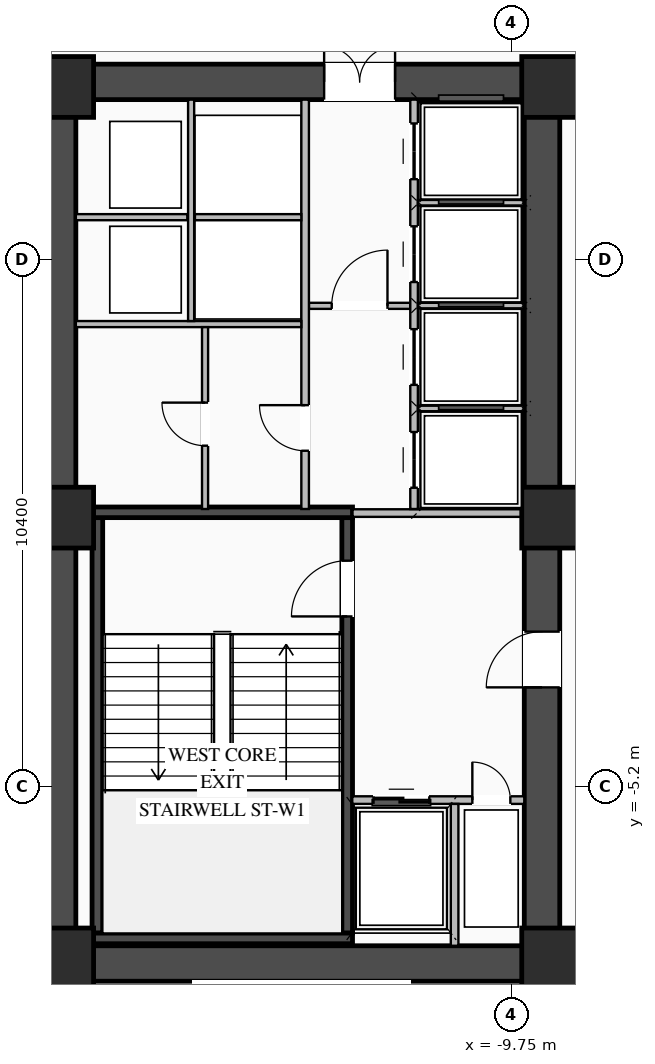
"""IFC4 building model, lengths in metres.
Left out: names, types, materials, properties, quantities, classifications, styles, units other than length and angle.
Written with IfcOpenShell. Run it as: python <this file> out.ifc"""

import sys

from ifc_helpers import new_model, si_unit, direction, frame, frame_2d, origin, origin_2d, place, context, subcontext, project, spatial, rectangle, extrude, element, fill, save


model = new_model("IFC4")
c1 = context("Model", 3, precision=1e-05, world=origin(), true_north=direction((0.0, 1.0)))
c2 = subcontext(c1, "Body", "Model", "MODEL_VIEW")
j1 = project(units=[si_unit("LENGTHUNIT", "METRE"), si_unit("PLANEANGLEUNIT", "RADIAN")], contexts=[c1])
p1 = place(None, origin())
s1 = spatial("IfcSite", under=j1, at=p1, CompositionType="ELEMENT")
p2 = place(p1, origin())
s2 = spatial("IfcBuilding", under=s1, at=p2, CompositionType="ELEMENT")
p3 = place(p2, frame((0.0, 0.0, 5.1)))
s3 = spatial("IfcBuildingStorey", under=s2, at=p3, CompositionType="ELEMENT", Elevation=5.1)
p4 = place(p3, frame((-19.05, -8.7, 0.0), z_axis=(0.0, 0.0, 1.0), x_axis=(1.0, 0.0, 0.0)))
e1 = element("IfcWall", 1, at=p4, inside=s3, PredefinedType="SHEAR", context=c2, shape_type="SweptSolid", body=[
    extrude(rectangle(XDim=10.25, YDim=0.7, at=frame_2d((5.125, 0.0))), origin(), (0.0, 0.0, 1.0), 4.25),
])
p5 = place(p3, frame((-19.05, 8.7, 0.0), z_axis=(0.0, 0.0, 1.0), x_axis=(1.0, 0.0, 0.0)))
e2 = element("IfcWall", 2, at=p5, inside=s3, PredefinedType="SHEAR", context=c2, shape_type="SweptSolid", body=[
    extrude(rectangle(XDim=10.25, YDim=0.7, at=frame_2d((5.125, 0.0))), origin(), (0.0, 0.0, 1.0), 4.25),
])
p6 = place(p5, frame((5.6, 0.0, 0.0)))
e3 = element("IfcOpeningElement", 3, at=p6, cuts=e2, PredefinedType="OPENING", context=c2, shape_type="SweptSolid", body=[
    extrude(rectangle(XDim=1.4, YDim=2.05, at=frame_2d((0.7, 1.025))), frame((0.0, 0.36, 0.0), z_axis=(0.0, -1.0, 0.0), x_axis=(1.0, 0.0, 0.0)), (0.0, 0.0, 1.0), 0.72),
])
p7 = place(p3, frame((-18.7, -8.35, 0.0), z_axis=(0.0, 0.0, 1.0), x_axis=(0.0, 1.0, 0.0)))
e4 = element("IfcWall", 4, at=p7, inside=s3, PredefinedType="SHEAR", context=c2, shape_type="SweptSolid", body=[
    extrude(rectangle(XDim=16.7, YDim=0.7, at=frame_2d((8.35, 0.0))), origin(), (0.0, 0.0, 1.0), 4.25),
])
p8 = place(p3, frame((-9.15, -8.35, 0.0), z_axis=(0.0, 0.0, 1.0), x_axis=(0.0, 1.0, 0.0)))
e5 = element("IfcWall", 5, at=p8, inside=s3, PredefinedType="SHEAR", context=c2, shape_type="SweptSolid", body=[
    extrude(rectangle(XDim=16.7, YDim=0.7, at=frame_2d((8.35, 0.0))), origin(), (0.0, 0.0, 1.0), 4.25),
])
p9 = place(p8, frame((5.1, 0.0, 0.0)))
e6 = element("IfcOpeningElement", 6, at=p9, cuts=e5, PredefinedType="OPENING", context=c2, shape_type="SweptSolid", body=[
    extrude(rectangle(XDim=1.1, YDim=2.08, at=frame_2d((0.55, 1.04))), frame((0.0, 0.36, 0.0), z_axis=(0.0, -1.0, 0.0), x_axis=(1.0, 0.0, 0.0)), (0.0, 0.0, 1.0), 0.72),
])
p10 = place(p3, frame((-12.995, -8.1, 0.0), z_axis=(0.0, 0.0, 1.0), x_axis=(0.0, 1.0, 0.0)))
e7 = element("IfcWall", 7, at=p10, inside=s3, PredefinedType="SHEAR", context=c2, shape_type="SweptSolid", body=[
    extrude(rectangle(XDim=8.2, YDim=0.21, at=frame_2d((4.1, 0.0))), origin(), (0.0, 0.0, 1.0), 4.25),
])
p11 = place(p10, frame((6.25, 0.0, 0.0)))
e8 = element("IfcOpeningElement", 8, at=p11, cuts=e7, PredefinedType="OPENING", context=c2, shape_type="SweptSolid", body=[
    extrude(rectangle(XDim=1.1, YDim=2.15, at=frame_2d((0.55, 1.075))), frame((0.0, 0.115, 0.0), z_axis=(0.0, -1.0, 0.0), x_axis=(1.0, 0.0, 0.0)), (0.0, 0.0, 1.0), 0.23),
])
p12 = place(p3, frame((-17.925, -8.1, 0.0), z_axis=(0.0, 0.0, 1.0), x_axis=(0.0, 1.0, 0.0)))
e9 = element("IfcWall", 9, at=p12, inside=s3, PredefinedType="SHEAR", context=c2, shape_type="SweptSolid", body=[
    extrude(rectangle(XDim=8.2, YDim=0.21, at=frame_2d((4.1, 0.0))), origin(), (0.0, 0.0, 1.0), 4.25),
])
for number, where, z_axis, x_axis in (
    (10, (-18.03, -8.205, 0.0), (0.0, 0.0, 1.0), (1.0, 0.0, 0.0)),
    (11, (-12.89, 0.205, 0.0), (0.0, 0.0, 1.0), (-1.0, 0.0, 0.0)),
):
    element("IfcWall", number, at=place(p3, frame(where, z_axis=z_axis, x_axis=x_axis)), inside=s3, PredefinedType="SHEAR", context=c2, shape_type="SweptSolid", body=[
        extrude(rectangle(XDim=5.14, YDim=0.21, at=frame_2d((2.57, 0.0))), origin(), (0.0, 0.0, 1.0), 4.25),
    ])
for number, where, z_axis, x_axis in (
    (12, (-8.95, -8.6, 0.0), (0.0, 0.0, 1.0), (1.0, 0.0, 0.0)),
    (13, (-8.95, 0.1, 0.0), (0.0, 0.0, 1.0), (1.0, 0.0, 0.0)),
    (14, (-8.95, 8.6, 0.0), (0.0, 0.0, 1.0), (1.0, 0.0, 0.0)),
    (15, (-18.6, -8.6, 0.0), (0.0, 0.0, 1.0), (1.0, 0.0, 0.0)),
    (16, (-18.6, 0.1, 0.0), (0.0, 0.0, 1.0), (1.0, 0.0, 0.0)),
    (17, (-18.6, 8.6, 0.0), (0.0, 0.0, 1.0), (1.0, 0.0, 0.0)),
):
    element("IfcColumn", number, at=place(p3, frame(where, z_axis=z_axis, x_axis=x_axis)), inside=s3, PredefinedType="COLUMN", context=c2, shape_type="SweptSolid", body=[
        extrude(rectangle(XDim=1.2, YDim=1.2, at=origin_2d()), origin(), (0.0, 0.0, 1.0), 4.5),
    ])
p13 = place(p3, frame((-12.895, -5.475, 0.0), z_axis=(0.0, 0.0, 1.0), x_axis=(1.0, 0.0, 0.0)))
e18 = element("IfcWall", 18, at=p13, inside=s3, PredefinedType="STANDARD", context=c2, shape_type="SweptSolid", body=[
    extrude(rectangle(XDim=3.395, YDim=0.15, at=frame_2d((1.698, 0.0))), origin(), (0.0, 0.0, 1.0), 4.23),
])
p14 = place(p13, frame((0.42, 0.0, 0.0)))
e19 = element("IfcOpeningElement", 19, at=p14, cuts=e18, PredefinedType="OPENING", context=c2, shape_type="SweptSolid", body=[
    extrude(rectangle(XDim=1.1, YDim=2.15, at=frame_2d((0.55, 1.075))), frame((0.0, 0.085, 0.0), z_axis=(0.0, -1.0, 0.0), x_axis=(1.0, 0.0, 0.0)), (0.0, 0.0, 1.0), 0.17),
])
p15 = place(p13, frame((2.37, 0.0, 0.0)))
e20 = element("IfcOpeningElement", 20, at=p15, cuts=e18, PredefinedType="OPENING", context=c2, shape_type="SweptSolid", body=[
    extrude(rectangle(XDim=0.75, YDim=2.05, at=frame_2d((0.375, 1.025))), frame((0.0, 0.085, 0.0), z_axis=(0.0, -1.0, 0.0), x_axis=(1.0, 0.0, 0.0)), (0.0, 0.0, 1.0), 0.17),
])
p16 = place(p3, frame((-10.875, -8.35, 0.0), z_axis=(0.0, 0.0, 1.0), x_axis=(0.0, 1.0, 0.0)))
e21 = element("IfcWall", 21, at=p16, inside=s3, PredefinedType="STANDARD", context=c2, shape_type="SweptSolid", body=[
    extrude(rectangle(XDim=2.8, YDim=0.15, at=frame_2d((1.4, 0.0))), origin(), (0.0, 0.0, 1.0), 4.23),
])
p17 = place(p3, frame((-12.89, 0.19, 0.0), z_axis=(0.0, 0.0, 1.0), x_axis=(1.0, 0.0, 0.0)))
e22 = element("IfcWall", 22, at=p17, inside=s3, PredefinedType="STANDARD", context=c2, shape_type="SweptSolid", body=[
    extrude(rectangle(XDim=3.39, YDim=0.15, at=frame_2d((1.695, 0.0))), origin(), (0.0, 0.0, 1.0), 3.525),
])
p18 = place(p3, frame((-13.75, 4.28, 0.0), z_axis=(0.0, 0.0, 1.0), x_axis=(1.0, 0.0, 0.0)))
e23 = element("IfcWall", 23, at=p18, inside=s3, PredefinedType="STANDARD", context=c2, shape_type="SweptSolid", body=[
    extrude(rectangle(XDim=2.0, YDim=0.12, at=frame_2d((1.0, 0.0))), origin(), (0.0, 0.0, 1.0), 4.23),
])
p19 = place(p18, frame((0.45, 0.0, 0.0)))
e24 = element("IfcOpeningElement", 24, at=p19, cuts=e23, PredefinedType="OPENING", context=c2, shape_type="SweptSolid", body=[
    extrude(rectangle(XDim=1.1, YDim=2.1, at=frame_2d((0.55, 1.05))), frame((0.0, 0.07, 0.0), z_axis=(0.0, -1.0, 0.0), x_axis=(1.0, 0.0, 0.0)), (0.0, 0.0, 1.0), 0.14),
])
p20 = place(p3, frame((-11.675, 0.27, 0.0), z_axis=(0.0, 0.0, 1.0), x_axis=(0.0, 1.0, 0.0)))
e25 = element("IfcWall", 25, at=p20, inside=s3, PredefinedType="STANDARD", context=c2, shape_type="SweptSolid", body=[
    extrude(rectangle(XDim=8.08, YDim=0.15, at=frame_2d((4.04, 0.0))), origin(), (0.0, 0.0, 1.0), 4.23),
])
p21 = place(p20, frame((0.42, 0.0, 0.0)))
e26 = element("IfcOpeningElement", 26, at=p21, cuts=e25, PredefinedType="OPENING", context=c2, shape_type="SweptSolid", body=[
    extrude(rectangle(XDim=1.1, YDim=2.1, at=frame_2d((0.55, 1.05))), frame((0.0, 0.085, 0.0), z_axis=(0.0, -1.0, 0.0), x_axis=(1.0, 0.0, 0.0)), (0.0, 0.0, 1.0), 0.17),
])
p22 = place(p20, frame((2.45, 0.0, 0.0)))
e27 = element("IfcOpeningElement", 27, at=p22, cuts=e25, PredefinedType="OPENING", context=c2, shape_type="SweptSolid", body=[
    extrude(rectangle(XDim=1.1, YDim=2.1, at=frame_2d((0.55, 1.05))), frame((0.0, 0.085, 0.0), z_axis=(0.0, -1.0, 0.0), x_axis=(1.0, 0.0, 0.0)), (0.0, 0.0, 1.0), 0.17),
])
p23 = place(p20, frame((4.48, 0.0, 0.0)))
e28 = element("IfcOpeningElement", 28, at=p23, cuts=e25, PredefinedType="OPENING", context=c2, shape_type="SweptSolid", body=[
    extrude(rectangle(XDim=1.1, YDim=2.1, at=frame_2d((0.55, 1.05))), frame((0.0, 0.085, 0.0), z_axis=(0.0, -1.0, 0.0), x_axis=(1.0, 0.0, 0.0)), (0.0, 0.0, 1.0), 0.17),
])
p24 = place(p20, frame((6.51, 0.0, 0.0)))
e29 = element("IfcOpeningElement", 29, at=p24, cuts=e25, PredefinedType="OPENING", context=c2, shape_type="SweptSolid", body=[
    extrude(rectangle(XDim=1.1, YDim=2.1, at=frame_2d((0.55, 1.05))), frame((0.0, 0.085, 0.0), z_axis=(0.0, -1.0, 0.0), x_axis=(1.0, 0.0, 0.0)), (0.0, 0.0, 1.0), 0.17),
])
for number, where, z_axis, x_axis in (
    (30, (-11.6, 2.255, 0.0), (0.0, 0.0, 1.0), (1.0, 0.0, 0.0)),
    (31, (-11.6, 4.285, 0.0), (0.0, 0.0, 1.0), (1.0, 0.0, 0.0)),
    (32, (-11.6, 6.315, 0.0), (0.0, 0.0, 1.0), (1.0, 0.0, 0.0)),
):
    element("IfcWall", number, at=place(p3, frame(where, z_axis=z_axis, x_axis=x_axis)), inside=s3, PredefinedType="STANDARD", context=c2, shape_type="SweptSolid", body=[
        extrude(rectangle(XDim=2.1, YDim=0.11, at=frame_2d((1.05, 0.0))), origin(), (0.0, 0.0, 1.0), 4.23),
    ])
p25 = place(p3, frame((-13.825, 0.27, 0.0), z_axis=(0.0, 0.0, 1.0), x_axis=(0.0, 1.0, 0.0)))
e33 = element("IfcWall", 33, at=p25, inside=s3, PredefinedType="STANDARD", context=c2, shape_type="SweptSolid", body=[
    extrude(rectangle(XDim=8.08, YDim=0.15, at=frame_2d((4.04, 0.0))), origin(), (0.0, 0.0, 1.0), 4.23),
])
p26 = place(p25, frame((1.15, 0.0, 0.0)))
e34 = element("IfcOpeningElement", 34, at=p26, cuts=e33, PredefinedType="OPENING", context=c2, shape_type="SweptSolid", body=[
    extrude(rectangle(XDim=0.9, YDim=2.05, at=frame_2d((0.45, 1.025))), frame((0.0, 0.085, 0.0), z_axis=(0.0, -1.0, 0.0), x_axis=(1.0, 0.0, 0.0)), (0.0, 0.0, 1.0), 0.17),
])
p27 = place(p3, frame((-18.35, 3.92, 0.0), z_axis=(0.0, 0.0, 1.0), x_axis=(1.0, 0.0, 0.0)))
e35 = element("IfcWall", 35, at=p27, inside=s3, PredefinedType="STANDARD", context=c2, shape_type="SweptSolid", body=[
    extrude(rectangle(XDim=4.45, YDim=0.12, at=frame_2d((2.225, 0.0))), origin(), (0.0, 0.0, 1.0), 4.23),
])
p28 = place(p3, frame((-18.35, 6.03, 0.0), z_axis=(0.0, 0.0, 1.0), x_axis=(1.0, 0.0, 0.0)))
e36 = element("IfcWall", 36, at=p28, inside=s3, PredefinedType="STANDARD", context=c2, shape_type="SweptSolid", body=[
    extrude(rectangle(XDim=2.2, YDim=0.12, at=frame_2d((1.1, 0.0))), origin(), (0.0, 0.0, 1.0), 4.23),
])
p29 = place(p3, frame((-16.075, 3.98, 0.0), z_axis=(0.0, 0.0, 1.0), x_axis=(0.0, 1.0, 0.0)))
e37 = element("IfcWall", 37, at=p29, inside=s3, PredefinedType="STANDARD", context=c2, shape_type="SweptSolid", body=[
    extrude(rectangle(XDim=4.37, YDim=0.12, at=frame_2d((2.185, 0.0))), origin(), (0.0, 0.0, 1.0), 4.23),
])
p30 = place(p3, frame((-16.0, 6.03, 0.0), z_axis=(0.0, 0.0, 1.0), x_axis=(1.0, 0.0, 0.0)))
e38 = element("IfcWall", 38, at=p30, inside=s3, PredefinedType="STANDARD", context=c2, shape_type="SweptSolid", body=[
    extrude(rectangle(XDim=2.1, YDim=0.12, at=frame_2d((1.05, 0.0))), origin(), (0.0, 0.0, 1.0), 4.23),
])
p31 = place(p3, frame((-15.8, 0.27, 0.0), z_axis=(0.0, 0.0, 1.0), x_axis=(0.0, 1.0, 0.0)))
e39 = element("IfcWall", 39, at=p31, inside=s3, PredefinedType="STANDARD", context=c2, shape_type="SweptSolid", body=[
    extrude(rectangle(XDim=3.59, YDim=0.12, at=frame_2d((1.795, 0.0))), origin(), (0.0, 0.0, 1.0), 4.23),
])
p32 = place(p31, frame((1.25, 0.0, 0.0)))
e40 = element("IfcOpeningElement", 40, at=p32, cuts=e39, PredefinedType="OPENING", context=c2, shape_type="SweptSolid", body=[
    extrude(rectangle(XDim=0.85, YDim=2.05, at=frame_2d((0.425, 1.025))), frame((0.0, 0.07, 0.0), z_axis=(0.0, -1.0, 0.0), x_axis=(1.0, 0.0, 0.0)), (0.0, 0.0, 1.0), 0.14),
])
p33 = place(p11, origin())
e41 = element("IfcDoor", 41, at=p33, inside=s3, OperationType="SINGLE_SWING_LEFT", PredefinedType="DOOR", context=c2, shape_type="SweptSolid", body=[
    extrude(rectangle(XDim=1.1, YDim=2.15, at=frame_2d((0.55, 1.075))), frame((0.0, 0.025, 0.0), z_axis=(0.0, -1.0, 0.0), x_axis=(1.0, 0.0, 0.0)), (0.0, 0.0, 1.0), 0.05),
])
fill(e8, e41)
p34 = place(p14, origin())
e42 = element("IfcDoor", 42, at=p34, inside=s3, OperationType="DOUBLE_DOOR_SLIDING", PredefinedType="DOOR", context=c2, shape_type="SweptSolid", body=[
    extrude(rectangle(XDim=1.1, YDim=2.15, at=frame_2d((0.55, 1.075))), frame((0.0, 0.025, 0.0), z_axis=(0.0, -1.0, 0.0), x_axis=(1.0, 0.0, 0.0)), (0.0, 0.0, 1.0), 0.05),
])
fill(e19, e42)
p35 = place(p15, origin())
e43 = element("IfcDoor", 43, at=p35, inside=s3, OperationType="SINGLE_SWING_LEFT", PredefinedType="DOOR", context=c2, shape_type="SweptSolid", body=[
    extrude(rectangle(XDim=0.75, YDim=2.05, at=frame_2d((0.375, 1.025))), frame((0.0, 0.025, 0.0), z_axis=(0.0, -1.0, 0.0), x_axis=(1.0, 0.0, 0.0)), (0.0, 0.0, 1.0), 0.05),
])
fill(e20, e43)
p36 = place(p9, origin())
e44 = element("IfcDoor", 44, at=p36, inside=s3, OperationType="SINGLE_SWING_LEFT", PredefinedType="DOOR", context=c2, shape_type="SweptSolid", body=[
    extrude(rectangle(XDim=1.1, YDim=2.08, at=frame_2d((0.55, 1.04))), frame((0.0, 0.305, 0.0), z_axis=(0.0, -1.0, 0.0), x_axis=(1.0, 0.0, 0.0)), (0.0, 0.0, 1.0), 0.05),
])
fill(e6, e44)
p37 = place(p19, origin())
e45 = element("IfcDoor", 45, at=p37, inside=s3, OperationType="SINGLE_SWING_RIGHT", PredefinedType="DOOR", context=c2, shape_type="SweptSolid", body=[
    extrude(rectangle(XDim=1.1, YDim=2.1, at=frame_2d((0.55, 1.05))), frame((0.0, 0.025, 0.0), z_axis=(0.0, -1.0, 0.0), x_axis=(1.0, 0.0, 0.0)), (0.0, 0.0, 1.0), 0.05),
])
fill(e24, e45)
p38 = place(p6, origin())
e46 = element("IfcDoor", 46, at=p38, inside=s3, OperationType="DOUBLE_DOOR_SINGLE_SWING", PredefinedType="DOOR", context=c2, shape_type="SweptSolid", body=[
    extrude(rectangle(XDim=1.4, YDim=2.05, at=frame_2d((0.7, 1.025))), frame((0.0, 0.295, 0.0), z_axis=(0.0, -1.0, 0.0), x_axis=(1.0, 0.0, 0.0)), (0.0, 0.0, 1.0), 0.05),
])
fill(e3, e46)
p39 = place(p21, origin())
e47 = element("IfcDoor", 47, at=p39, inside=s3, OperationType="DOUBLE_DOOR_SLIDING", PredefinedType="DOOR", context=c2, shape_type="SweptSolid", body=[
    extrude(rectangle(XDim=1.1, YDim=2.1, at=frame_2d((0.55, 1.05))), frame((0.0, 0.025, 0.0), z_axis=(0.0, -1.0, 0.0), x_axis=(1.0, 0.0, 0.0)), (0.0, 0.0, 1.0), 0.05),
])
fill(e26, e47)
p40 = place(p22, origin())
e48 = element("IfcDoor", 48, at=p40, inside=s3, OperationType="DOUBLE_DOOR_SLIDING", PredefinedType="DOOR", context=c2, shape_type="SweptSolid", body=[
    extrude(rectangle(XDim=1.1, YDim=2.1, at=frame_2d((0.55, 1.05))), frame((0.0, 0.025, 0.0), z_axis=(0.0, -1.0, 0.0), x_axis=(1.0, 0.0, 0.0)), (0.0, 0.0, 1.0), 0.05),
])
fill(e27, e48)
p41 = place(p23, origin())
e49 = element("IfcDoor", 49, at=p41, inside=s3, OperationType="DOUBLE_DOOR_SLIDING", PredefinedType="DOOR", context=c2, shape_type="SweptSolid", body=[
    extrude(rectangle(XDim=1.1, YDim=2.1, at=frame_2d((0.55, 1.05))), frame((0.0, 0.025, 0.0), z_axis=(0.0, -1.0, 0.0), x_axis=(1.0, 0.0, 0.0)), (0.0, 0.0, 1.0), 0.05),
])
fill(e28, e49)
p42 = place(p24, origin())
e50 = element("IfcDoor", 50, at=p42, inside=s3, OperationType="DOUBLE_DOOR_SLIDING", PredefinedType="DOOR", context=c2, shape_type="SweptSolid", body=[
    extrude(rectangle(XDim=1.1, YDim=2.1, at=frame_2d((0.55, 1.05))), frame((0.0, 0.025, 0.0), z_axis=(0.0, -1.0, 0.0), x_axis=(1.0, 0.0, 0.0)), (0.0, 0.0, 1.0), 0.05),
])
fill(e29, e50)
p43 = place(p26, origin())
e51 = element("IfcDoor", 51, at=p43, inside=s3, OperationType="SINGLE_SWING_RIGHT", PredefinedType="DOOR", context=c2, shape_type="SweptSolid", body=[
    extrude(rectangle(XDim=0.9, YDim=2.05, at=frame_2d((0.45, 1.025))), frame((0.0, 0.025, 0.0), z_axis=(0.0, -1.0, 0.0), x_axis=(1.0, 0.0, 0.0)), (0.0, 0.0, 1.0), 0.05),
])
fill(e34, e51)
p44 = place(p32, origin())
e52 = element("IfcDoor", 52, at=p44, inside=s3, OperationType="SINGLE_SWING_RIGHT", PredefinedType="DOOR", context=c2, shape_type="SweptSolid", body=[
    extrude(rectangle(XDim=0.85, YDim=2.05, at=frame_2d((0.425, 1.025))), frame((0.0, 0.025, 0.0), z_axis=(0.0, -1.0, 0.0), x_axis=(1.0, 0.0, 0.0)), (0.0, 0.0, 1.0), 0.05),
])
fill(e40, e52)
save(model, sys.argv[1])
